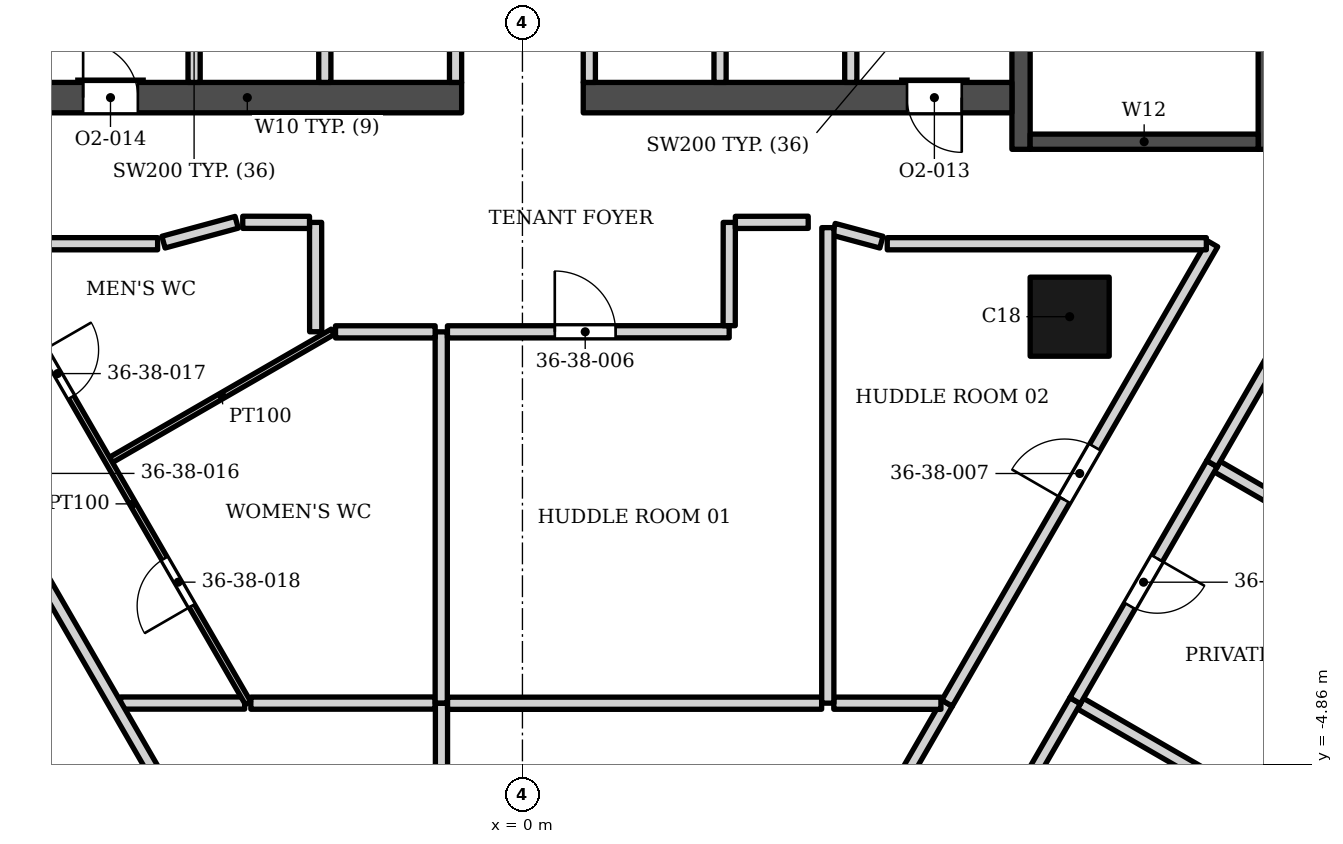
"""IFC4 building model, lengths in metres.
Left out: names, types, materials, properties, quantities, classifications, styles, units other than length and angle.
Written with IfcOpenShell. Run it as: python <this file> out.ifc"""

import sys

from ifc_helpers import new_model, si_unit, direction, frame, frame_2d, origin, origin_2d, place, context, subcontext, project, spatial, rectangle, extrude, element, fill, save


model = new_model("IFC4")
c1 = context("Model", 3, precision=1e-05, world=origin(), true_north=direction((0.0, 1.0)))
c2 = subcontext(c1, "Body", "Model", "MODEL_VIEW")
j1 = project(units=[si_unit("LENGTHUNIT", "METRE"), si_unit("PLANEANGLEUNIT", "RADIAN")], contexts=[c1])
p1 = place(None, origin())
s1 = spatial("IfcSite", under=j1, at=p1, CompositionType="ELEMENT")
p2 = place(p1, origin())
s2 = spatial("IfcBuilding", under=s1, at=p2, CompositionType="ELEMENT")
p3 = place(p2, frame((0.0, 0.0, 156.3)))
s3 = spatial("IfcBuildingStorey", under=s2, at=p3, CompositionType="ELEMENT", Elevation=156.3)
p4 = place(p3, frame((12.35, 5.253, 0.0), z_axis=(0.0, 0.0, 1.0), x_axis=(0.0, 1.0, 0.0)))
e1 = element("IfcWall", 1, at=p4, inside=s3, PredefinedType="SHEAR", context=c2, shape_type="SweptSolid", body=[
    extrude(rectangle(XDim=13.3, YDim=0.5, at=frame_2d((6.65, 0.0))), origin(), (0.0, 0.0, 1.0), 3.9),
])
p5 = place(p3, frame((8.2, 5.253, 0.0), z_axis=(0.0, 0.0, 1.0), x_axis=(0.0, 1.0, 0.0)))
e2 = element("IfcWall", 2, at=p5, inside=s3, PredefinedType="SHEAR", context=c2, shape_type="SweptSolid", body=[
    extrude(rectangle(XDim=13.3, YDim=0.3, at=frame_2d((6.65, 0.0))), origin(), (0.0, 0.0, 1.0), 3.9),
])
p6 = place(p5, frame((7.1, 0.0, 0.0)))
e3 = element("IfcOpeningElement", 3, at=p6, cuts=e2, PredefinedType="OPENING", context=c2, shape_type="SweptSolid", body=[
    extrude(rectangle(XDim=1.4, YDim=2.1, at=frame_2d((0.7, 1.05))), frame((0.0, 0.16, 0.0), z_axis=(0.0, -1.0, 0.0), x_axis=(1.0, 0.0, 0.0)), (0.0, 0.0, 1.0), 0.32),
])
p7 = place(p5, frame((5.05, 0.0, 0.0)))
e4 = element("IfcOpeningElement", 4, at=p7, cuts=e2, PredefinedType="OPENING", context=c2, shape_type="SweptSolid", body=[
    extrude(rectangle(XDim=1.4, YDim=2.1, at=frame_2d((0.7, 1.05))), frame((0.0, 0.16, 0.0), z_axis=(0.0, -1.0, 0.0), x_axis=(1.0, 0.0, 0.0)), (0.0, 0.0, 1.0), 0.32),
])
p8 = place(p3, frame((8.35, 5.378, 0.0), z_axis=(0.0, 0.0, 1.0), x_axis=(1.0, 0.0, 0.0)))
e5 = element("IfcWall", 5, at=p8, inside=s3, PredefinedType="SHEAR", context=c2, shape_type="SweptSolid", body=[
    extrude(rectangle(XDim=3.75, YDim=0.25, at=frame_2d((1.875, 0.0))), origin(), (0.0, 0.0, 1.0), 3.9),
])
p9 = place(p3, frame((-8.05, 6.103, 0.0), z_axis=(0.0, 0.0, 1.0), x_axis=(1.0, 0.0, 0.0)))
e6 = element("IfcWall", 6, at=p9, inside=s3, PredefinedType="SHEAR", context=c2, shape_type="SweptSolid", body=[
    extrude(rectangle(XDim=7.05, YDim=0.5, at=frame_2d((3.525, 0.0))), origin(), (0.0, 0.0, 1.0), 3.9),
])
p10 = place(p9, frame((0.825, 0.0, 0.0)))
e7 = element("IfcOpeningElement", 7, at=p10, cuts=e6, PredefinedType="OPENING", context=c2, shape_type="SweptSolid", body=[
    extrude(rectangle(XDim=0.9, YDim=2.1, at=frame_2d((0.45, 1.05))), frame((0.0, 0.26, 0.0), z_axis=(0.0, -1.0, 0.0), x_axis=(1.0, 0.0, 0.0)), (0.0, 0.0, 1.0), 0.52),
])
p11 = place(p3, frame((1.0, 6.103, 0.0), z_axis=(0.0, 0.0, 1.0), x_axis=(1.0, 0.0, 0.0)))
e8 = element("IfcWall", 8, at=p11, inside=s3, PredefinedType="SHEAR", context=c2, shape_type="SweptSolid", body=[
    extrude(rectangle(XDim=7.05, YDim=0.5, at=frame_2d((3.525, 0.0))), origin(), (0.0, 0.0, 1.0), 3.9),
])
p12 = place(p11, frame((5.325, 0.0, 0.0)))
e9 = element("IfcOpeningElement", 9, at=p12, cuts=e8, PredefinedType="OPENING", context=c2, shape_type="SweptSolid", body=[
    extrude(rectangle(XDim=0.9, YDim=2.1, at=frame_2d((0.45, 1.05))), frame((0.0, 0.26, 0.0), z_axis=(0.0, -1.0, 0.0), x_axis=(1.0, 0.0, 0.0)), (0.0, 0.0, 1.0), 0.52),
])
p13 = place(p3, frame((9.0, 2.5, 0.0), z_axis=(0.0, 0.0, 1.0), x_axis=(1.0, 0.0, 0.0)))
e10 = element("IfcColumn", 10, at=p13, inside=s3, PredefinedType="COLUMN", context=c2, shape_type="SweptSolid", body=[
    extrude(rectangle(XDim=1.3, YDim=1.3, at=origin_2d()), origin(), (0.0, 0.0, 1.0), 3.9),
])
for number, where, z_axis, x_axis in (
    (11, (-5.4, 6.353, 0.0), (0.0, 0.0, 1.0), (0.0, 1.0, 0.0)),
    (12, (-3.25, 6.353, 0.0), (0.0, 0.0, 1.0), (0.0, 1.0, 0.0)),
    (13, (-1.1, 6.353, 0.0), (0.0, 0.0, 1.0), (0.0, 1.0, 0.0)),
    (14, (1.1, 6.353, 0.0), (0.0, 0.0, 1.0), (0.0, 1.0, 0.0)),
    (15, (3.25, 6.353, 0.0), (0.0, 0.0, 1.0), (0.0, 1.0, 0.0)),
    (16, (5.4, 6.353, 0.0), (0.0, 0.0, 1.0), (0.0, 1.0, 0.0)),
):
    element("IfcWall", number, at=place(p3, frame(where, z_axis=z_axis, x_axis=x_axis)), inside=s3, PredefinedType="SOLIDWALL", context=c2, shape_type="SweptSolid", body=[
        extrude(rectangle(XDim=2.5, YDim=0.2, at=frame_2d((1.25, 0.0))), origin(), (0.0, 0.0, 1.0), 3.73),
    ])
p14 = place(p3, frame((-11.065, 0.082, 0.0), z_axis=(0.0, 0.0, 1.0), x_axis=(0.499996012009, -0.86602770624, 0.0)))
e17 = element("IfcWall", 17, at=p14, inside=s3, PredefinedType="PARTITIONING", context=c2, shape_type="SweptSolid", body=[
    extrude(rectangle(XDim=18.0, YDim=0.2, at=frame_2d((9.0, 0.0))), origin(), (0.0, 0.0, 1.0), 2.884),
])
p15 = place(p14, frame((4.0, 0.0, 0.0)))
e18 = element("IfcOpeningElement", 18, at=p15, cuts=e17, PredefinedType="OPENING", context=c2, shape_type="SweptSolid", body=[
    extrude(rectangle(XDim=1.0, YDim=2.1, at=frame_2d((0.5, 1.05))), frame((0.0, 0.11, 0.0), z_axis=(0.0, -1.0, 0.0), x_axis=(1.0, 0.0, 0.0)), (0.0, 0.0, 1.0), 0.22),
])
p16 = place(p14, frame((13.0, 0.0, 0.0)))
e19 = element("IfcOpeningElement", 19, at=p16, cuts=e17, PredefinedType="OPENING", context=c2, shape_type="SweptSolid", body=[
    extrude(rectangle(XDim=1.0, YDim=2.4, at=frame_2d((0.5, 1.2))), frame((0.0, 0.11, 0.0), z_axis=(0.0, -1.0, 0.0), x_axis=(1.0, 0.0, 0.0)), (0.0, 0.0, 1.0), 0.22),
])
p17 = place(p3, frame((3.426, -10.022, 0.0), z_axis=(0.0, 0.0, 1.0), x_axis=(0.499791742778, 0.866145607765, 0.0)))
e20 = element("IfcWall", 20, at=p17, inside=s3, PredefinedType="PARTITIONING", context=c2, shape_type="SweptSolid", body=[
    extrude(rectangle(XDim=7.117, YDim=0.2, at=frame_2d((3.559, 0.0))), origin(), (0.0, 0.0, 1.0), 2.884),
])
p18 = place(p17, frame((3.11, 0.0, 0.0)))
e21 = element("IfcOpeningElement", 21, at=p18, cuts=e20, PredefinedType="OPENING", context=c2, shape_type="SweptSolid", body=[
    extrude(rectangle(XDim=0.9, YDim=2.1, at=frame_2d((0.45, 1.05))), frame((0.0, 0.11, 0.0), z_axis=(0.0, -1.0, 0.0), x_axis=(1.0, 0.0, 0.0)), (0.0, 0.0, 1.0), 0.22),
])
p19 = place(p3, frame((-4.467, -3.855, 0.0), z_axis=(0.0, 0.0, 1.0), x_axis=(0.999999841097, 0.000563743166, 0.0)))
e22 = element("IfcWall", 22, at=p19, inside=s3, PredefinedType="PARTITIONING", context=c2, shape_type="SweptSolid", body=[
    extrude(rectangle(XDim=3.031, YDim=0.2, at=frame_2d((1.516, 0.0))), origin(), (0.0, 0.0, 1.0), 3.73),
])
p20 = place(p3, frame((-1.332, -12.767, 0.0), z_axis=(0.0, 0.0, 1.0), x_axis=(0.0, 1.0, 0.0)))
e23 = element("IfcWall", 23, at=p20, inside=s3, PredefinedType="PARTITIONING", context=c2, shape_type="SweptSolid", body=[
    extrude(rectangle(XDim=8.909, YDim=0.2, at=frame_2d((4.455, 0.0))), origin(), (0.0, 0.0, 1.0), 2.95),
])
p21 = place(p3, frame((-1.232, -3.857, 0.0), z_axis=(0.0, 0.0, 1.0), x_axis=(0.999999961423, 0.000277766745, 0.0)))
e24 = element("IfcWall", 24, at=p21, inside=s3, PredefinedType="PARTITIONING", context=c2, shape_type="SweptSolid", body=[
    extrude(rectangle(XDim=6.153, YDim=0.2, at=frame_2d((3.076, 0.0))), origin(), (0.0, 0.0, 1.0), 3.73),
])
p22 = place(p3, frame((5.121, -3.856, 0.0), z_axis=(0.0, 0.0, 1.0), x_axis=(0.999999529486, -0.000970066062, 0.0)))
e25 = element("IfcWall", 25, at=p22, inside=s3, PredefinedType="PARTITIONING", context=c2, shape_type="SweptSolid", body=[
    extrude(rectangle(XDim=1.762, YDim=0.2, at=frame_2d((0.881, 0.0))), origin(), (0.0, 0.0, 1.0), 3.73),
])
p23 = place(p3, frame((6.984, -3.855, 0.0), z_axis=(0.0, 0.0, 1.0), x_axis=(0.500195547237, 0.865912475095, 0.0)))
e26 = element("IfcWall", 26, at=p23, inside=s3, PredefinedType="PARTITIONING", context=c2, shape_type="SweptSolid", body=[
    extrude(rectangle(XDim=8.725, YDim=0.2, at=frame_2d((4.363, 0.0))), origin(), (0.0, 0.0, 1.0), 3.052),
])
p24 = place(p23, frame((3.861, 0.0, 0.0)))
e27 = element("IfcOpeningElement", 27, at=p24, cuts=e26, PredefinedType="OPENING", context=c2, shape_type="SweptSolid", body=[
    extrude(rectangle(XDim=1.0, YDim=2.1, at=frame_2d((0.5, 1.05))), frame((0.0, 0.11, 0.0), z_axis=(0.0, -1.0, 0.0), x_axis=(1.0, 0.0, 0.0)), (0.0, 0.0, 1.0), 0.22),
])
p25 = place(p3, frame((9.176, -3.862, 0.0), z_axis=(0.0, 0.0, 1.0), x_axis=(0.865807555134, -0.500377135241, 0.0)))
e28 = element("IfcWall", 28, at=p25, inside=s3, PredefinedType="PARTITIONING", context=c2, shape_type="SweptSolid", body=[
    extrude(rectangle(XDim=4.25, YDim=0.2, at=frame_2d((2.125, 0.0))), origin(), (0.0, 0.0, 1.0), 3.052),
])
p26 = place(p3, frame((-6.61, -3.854, 0.0), z_axis=(0.0, 0.0, 1.0), x_axis=(0.999999992849, 0.000119588614, 0.0)))
e29 = element("IfcWall", 29, at=p26, inside=s3, PredefinedType="PARTITIONING", context=c2, shape_type="SweptSolid", body=[
    extrude(rectangle(XDim=2.042, YDim=0.2, at=frame_2d((1.021, 0.0))), origin(), (0.0, 0.0, 1.0), 3.73),
])
p27 = place(p3, frame((-1.335, -3.854, 0.0), z_axis=(0.0, 0.0, 1.0), x_axis=(0.0, 1.0, 0.0)))
e30 = element("IfcWall", 30, at=p27, inside=s3, PredefinedType="PARTITIONING", context=c2, shape_type="SweptSolid", body=[
    extrude(rectangle(XDim=6.104, YDim=0.2, at=frame_2d((3.052, 0.0))), origin(), (0.0, 0.0, 1.0), 3.73),
])
p28 = place(p3, frame((6.841, -7.71, 0.0), z_axis=(0.0, 0.0, 1.0), x_axis=(0.499974615194, 0.866040059213, 0.0)))
e31 = element("IfcWall", 31, at=p28, inside=s3, PredefinedType="PARTITIONING", context=c2, shape_type="SweptSolid", body=[
    extrude(rectangle(XDim=4.498, YDim=0.2, at=frame_2d((2.249, 0.0))), origin(), (0.0, 0.0, 1.0), 3.052),
])
p29 = place(p28, frame((1.798, 0.0, 0.0)))
e32 = element("IfcOpeningElement", 32, at=p29, cuts=e31, PredefinedType="OPENING", context=c2, shape_type="SweptSolid", body=[
    extrude(rectangle(XDim=0.9, YDim=2.1, at=frame_2d((0.45, 1.05))), frame((0.0, 0.11, 0.0), z_axis=(0.0, -1.0, 0.0), x_axis=(1.0, 0.0, 0.0)), (0.0, 0.0, 1.0), 0.22),
])
p30 = place(p3, frame((11.427, 0.035, 0.0), z_axis=(0.0, 0.0, 1.0), x_axis=(0.865857330643, -0.500290998291, 0.0)))
e33 = element("IfcWall", 33, at=p30, inside=s3, PredefinedType="PARTITIONING", context=c2, shape_type="SweptSolid", body=[
    extrude(rectangle(XDim=4.25, YDim=0.2, at=frame_2d((2.125, 0.0))), origin(), (0.0, 0.0, 1.0), 3.052),
])
p31 = place(p3, frame((9.09, -3.815, 0.0), z_axis=(0.0, 0.0, 1.0), x_axis=(0.499972939495, 0.866041026611, 0.0)))
e34 = element("IfcWall", 34, at=p31, inside=s3, PredefinedType="PARTITIONING", context=c2, shape_type="SweptSolid", body=[
    extrude(rectangle(XDim=4.5, YDim=0.2, at=frame_2d((2.25, 0.0))), origin(), (0.0, 0.0, 1.0), 3.052),
])
p32 = place(p31, frame((1.8, 0.0, 0.0)))
e35 = element("IfcOpeningElement", 35, at=p32, cuts=e34, PredefinedType="OPENING", context=c2, shape_type="SweptSolid", body=[
    extrude(rectangle(XDim=0.9, YDim=2.1, at=frame_2d((0.45, 1.05))), frame((0.0, 0.11, 0.0), z_axis=(0.0, -1.0, 0.0), x_axis=(1.0, 0.0, 0.0)), (0.0, 0.0, 1.0), 0.22),
])
p33 = place(p3, frame((-3.402, 4.051, 0.0), z_axis=(0.0, 0.0, 1.0), x_axis=(0.001086217961, -0.999999410065, 0.0)))
e36 = element("IfcWall", 36, at=p33, inside=s3, PredefinedType="PARTITIONING", context=c2, shape_type="SweptSolid", body=[
    extrude(rectangle(XDim=1.798, YDim=0.2, at=frame_2d((0.899, 0.0))), origin(), (0.0, 0.0, 1.0), 3.73),
])
p34 = place(p3, frame((-6.767, 0.145, 0.0), z_axis=(0.0, 0.0, 1.0), x_axis=(0.865929781716, 0.500165585718, 0.0)))
e37 = element("IfcWall", 37, at=p34, inside=s3, PredefinedType="PARTITIONING", context=c2, shape_type="SweptSolid", body=[
    extrude(rectangle(XDim=4.212, YDim=0.1, at=frame_2d((2.106, 0.0))), origin(), (0.0, 0.0, 1.0), 2.884),
])
p35 = place(p3, frame((-3.074, 2.25, 0.0), z_axis=(0.0, 0.0, 1.0), x_axis=(1.0, 0.0, 0.0)))
e38 = element("IfcWall", 38, at=p35, inside=s3, PredefinedType="PARTITIONING", context=c2, shape_type="SweptSolid", body=[
    extrude(rectangle(XDim=1.639, YDim=0.2, at=frame_2d((0.819, 0.0))), origin(), (0.0, 0.0, 1.0), 3.73),
])
p36 = place(p3, frame((-1.233, 2.25, 0.0), z_axis=(0.0, 0.0, 1.0), x_axis=(0.999999911161, 0.000421518483, 0.0)))
e39 = element("IfcWall", 39, at=p36, inside=s3, PredefinedType="PARTITIONING", context=c2, shape_type="SweptSolid", body=[
    extrude(rectangle(XDim=4.634, YDim=0.2, at=frame_2d((2.317, 0.0))), origin(), (0.0, 0.0, 1.0), 3.73),
])
p37 = place(p36, frame((1.766, 0.0, 0.0)))
e40 = element("IfcOpeningElement", 40, at=p37, cuts=e39, PredefinedType="OPENING", context=c2, shape_type="SweptSolid", body=[
    extrude(rectangle(XDim=1.0, YDim=2.1, at=frame_2d((0.5, 1.05))), frame((0.0, 0.11, 0.0), z_axis=(0.0, -1.0, 0.0), x_axis=(1.0, 0.0, 0.0)), (0.0, 0.0, 1.0), 0.22),
])
p38 = place(p3, frame((-8.3, 2.697, 0.0), z_axis=(0.0, 0.0, 1.0), x_axis=(0.500524865803, -0.86572216023, 0.0)))
e41 = element("IfcWall", 41, at=p38, inside=s3, PredefinedType="PARTITIONING", context=c2, shape_type="SweptSolid", body=[
    extrude(rectangle(XDim=7.566, YDim=0.1, at=frame_2d((3.783, 0.0))), origin(), (0.0, 0.0, 1.0), 2.884),
])
p39 = place(p38, frame((0.858, 0.0, 0.0)))
e42 = element("IfcOpeningElement", 42, at=p39, cuts=e41, PredefinedType="OPENING", context=c2, shape_type="SweptSolid", body=[
    extrude(rectangle(XDim=0.9, YDim=2.1, at=frame_2d((0.45, 1.05))), frame((0.0, 0.06, 0.0), z_axis=(0.0, -1.0, 0.0), x_axis=(1.0, 0.0, 0.0)), (0.0, 0.0, 1.0), 0.12),
])
p40 = place(p38, frame((4.82, 0.0, 0.0)))
e43 = element("IfcOpeningElement", 43, at=p40, cuts=e41, PredefinedType="OPENING", context=c2, shape_type="SweptSolid", body=[
    extrude(rectangle(XDim=0.9, YDim=2.1, at=frame_2d((0.45, 1.05))), frame((0.0, 0.06, 0.0), z_axis=(0.0, -1.0, 0.0), x_axis=(1.0, 0.0, 0.0)), (0.0, 0.0, 1.0), 0.12),
])
p41 = place(p3, frame((-11.073, 3.7, 0.0), z_axis=(0.0, 0.0, 1.0), x_axis=(0.50018368245, -0.865919328697, 0.0)))
e44 = element("IfcWall", 44, at=p41, inside=s3, PredefinedType="PARTITIONING", context=c2, shape_type="SweptSolid", body=[
    extrude(rectangle(XDim=19.274, YDim=0.2, at=frame_2d((9.637, 0.0))), origin(), (0.0, 0.0, 1.0), 2.884),
])
p42 = place(p41, frame((13.651, 0.0, 0.0)))
e45 = element("IfcOpeningElement", 45, at=p42, cuts=e44, PredefinedType="OPENING", context=c2, shape_type="SweptSolid", body=[
    extrude(rectangle(XDim=0.9, YDim=2.1, at=frame_2d((0.45, 1.05))), frame((0.0, 0.11, 0.0), z_axis=(0.0, -1.0, 0.0), x_axis=(1.0, 0.0, 0.0)), (0.0, 0.0, 1.0), 0.22),
])
p43 = place(p41, frame((3.862, 0.0, 0.0)))
e46 = element("IfcOpeningElement", 46, at=p43, cuts=e44, PredefinedType="OPENING", context=c2, shape_type="SweptSolid", body=[
    extrude(rectangle(XDim=1.0, YDim=2.1, at=frame_2d((0.5, 1.05))), frame((0.0, 0.11, 0.0), z_axis=(0.0, -1.0, 0.0), x_axis=(1.0, 0.0, 0.0)), (0.0, 0.0, 1.0), 0.22),
])
p44 = place(p3, frame((-10.973, 3.7, 0.0), z_axis=(0.0, 0.0, 1.0), x_axis=(1.0, 0.0, 0.0)))
e47 = element("IfcWall", 47, at=p44, inside=s3, PredefinedType="PARTITIONING", context=c2, shape_type="SweptSolid", body=[
    extrude(rectangle(XDim=4.973, YDim=0.2, at=frame_2d((2.486, 0.0))), origin(), (0.0, 0.0, 1.0), 3.332),
])
p45 = place(p3, frame((6.0, 3.7, 0.0), z_axis=(0.0, 0.0, 1.0), x_axis=(1.0, 0.0, 0.0)))
e48 = element("IfcWall", 48, at=p45, inside=s3, PredefinedType="PARTITIONING", context=c2, shape_type="SweptSolid", body=[
    extrude(rectangle(XDim=5.248, YDim=0.2, at=frame_2d((2.624, 0.0))), origin(), (0.0, 0.0, 1.0), 3.332),
])
p46 = place(p3, frame((11.341, 0.083, 0.0), z_axis=(0.0, 0.0, 1.0), x_axis=(0.499673523279, 0.866213813174, 0.0)))
e49 = element("IfcWall", 49, at=p46, inside=s3, PredefinedType="PARTITIONING", context=c2, shape_type="SweptSolid", body=[
    extrude(rectangle(XDim=4.176, YDim=0.2, at=frame_2d((2.088, 0.0))), origin(), (0.0, 0.0, 1.0), 3.052),
])
p47 = place(p3, frame((5.118, 3.937, 0.0), z_axis=(0.0, 0.0, 1.0), x_axis=(0.965583853378, -0.260091949308, 0.0)))
e50 = element("IfcWall", 50, at=p47, inside=s3, PredefinedType="PARTITIONING", context=c2, shape_type="SweptSolid", body=[
    extrude(rectangle(XDim=0.813, YDim=0.2, at=frame_2d((0.406, 0.0))), origin(), (0.0, 0.0, 1.0), 3.73),
])
p48 = place(p3, frame((5.022, -3.855, 0.0), z_axis=(0.0, 0.0, 1.0), x_axis=(0.000218538286, 0.999999976121, 0.0)))
e51 = element("IfcWall", 51, at=p48, inside=s3, PredefinedType="PARTITIONING", context=c2, shape_type="SweptSolid", body=[
    extrude(rectangle(XDim=7.82, YDim=0.2, at=frame_2d((3.91, 0.0))), origin(), (0.0, 0.0, 1.0), 3.73),
])
p49 = place(p3, frame((-5.904, 3.726, 0.0), z_axis=(0.0, 0.0, 1.0), x_axis=(0.965137813174, 0.26174224264, 0.0)))
e52 = element("IfcWall", 52, at=p49, inside=s3, PredefinedType="PARTITIONING", context=c2, shape_type="SweptSolid", body=[
    extrude(rectangle(XDim=1.247, YDim=0.2, at=frame_2d((0.624, 0.0))), origin(), (0.0, 0.0, 1.0), 2.884),
])
p50 = place(p3, frame((-4.6, 4.052, 0.0), z_axis=(0.0, 0.0, 1.0), x_axis=(0.999999110322, -0.001333925003, 0.0)))
e53 = element("IfcWall", 53, at=p50, inside=s3, PredefinedType="PARTITIONING", context=c2, shape_type="SweptSolid", body=[
    extrude(rectangle(XDim=1.098, YDim=0.2, at=frame_2d((0.549, 0.0))), origin(), (0.0, 0.0, 1.0), 3.73),
])
p51 = place(p3, frame((3.4, 2.352, 0.0), z_axis=(0.0, 0.0, 1.0), x_axis=(0.001150085496, 0.999999338651, 0.0)))
e54 = element("IfcWall", 54, at=p51, inside=s3, PredefinedType="PARTITIONING", context=c2, shape_type="SweptSolid", body=[
    extrude(rectangle(XDim=1.698, YDim=0.2, at=frame_2d((0.849, 0.0))), origin(), (0.0, 0.0, 1.0), 3.73),
])
p52 = place(p3, frame((3.502, 4.051, 0.0), z_axis=(0.0, 0.0, 1.0), x_axis=(0.999998982503, 0.001426532072, 0.0)))
e55 = element("IfcWall", 55, at=p52, inside=s3, PredefinedType="PARTITIONING", context=c2, shape_type="SweptSolid", body=[
    extrude(rectangle(XDim=1.198, YDim=0.2, at=frame_2d((0.599, 0.0))), origin(), (0.0, 0.0, 1.0), 3.73),
])
p53 = place(p10, origin())
e56 = element("IfcDoor", 56, at=p53, inside=s3, OperationType="SINGLE_SWING_LEFT", PredefinedType="DOOR", context=c2, shape_type="SweptSolid", body=[
    extrude(rectangle(XDim=0.9, YDim=2.1, at=frame_2d((0.45, 1.05))), frame((0.0, 0.025, 0.0), z_axis=(0.0, -1.0, 0.0), x_axis=(1.0, 0.0, 0.0)), (0.0, 0.0, 1.0), 0.05),
])
fill(e7, e56)
p54 = place(p12, origin())
e57 = element("IfcDoor", 57, at=p54, inside=s3, OperationType="SINGLE_SWING_RIGHT", PredefinedType="DOOR", context=c2, shape_type="SweptSolid", body=[
    extrude(rectangle(XDim=0.9, YDim=2.1, at=frame_2d((0.45, 1.05))), frame((0.0, 0.025, 0.0), z_axis=(0.0, -1.0, 0.0), x_axis=(1.0, 0.0, 0.0)), (0.0, 0.0, 1.0), 0.05),
])
fill(e9, e57)
p55 = place(p32, origin())
e58 = element("IfcDoor", 58, at=p55, inside=s3, OperationType="SINGLE_SWING_RIGHT", PredefinedType="DOOR", context=c2, shape_type="SweptSolid", body=[
    extrude(rectangle(XDim=0.9, YDim=2.1, at=frame_2d((0.45, 1.05))), frame((0.0, 0.025, 0.0), z_axis=(0.0, -1.0, 0.0), x_axis=(1.0, 0.0, 0.0)), (0.0, 0.0, 1.0), 0.05),
])
fill(e35, e58)
p56 = place(p37, origin())
e59 = element("IfcDoor", 59, at=p56, inside=s3, OperationType="SINGLE_SWING_LEFT", PredefinedType="DOOR", context=c2, shape_type="SweptSolid", body=[
    extrude(rectangle(XDim=1.0, YDim=2.1, at=frame_2d((0.5, 1.05))), frame((0.0, 0.025, 0.0), z_axis=(0.0, -1.0, 0.0), x_axis=(1.0, 0.0, 0.0)), (0.0, 0.0, 1.0), 0.05),
])
fill(e40, e59)
p57 = place(p24, origin())
e60 = element("IfcDoor", 60, at=p57, inside=s3, OperationType="SINGLE_SWING_LEFT", PredefinedType="DOOR", context=c2, shape_type="SweptSolid", body=[
    extrude(rectangle(XDim=1.0, YDim=2.1, at=frame_2d((0.5, 1.05))), frame((0.0, 0.025, 0.0), z_axis=(0.0, -1.0, 0.0), x_axis=(1.0, 0.0, 0.0)), (0.0, 0.0, 1.0), 0.05),
])
fill(e27, e60)
p58 = place(p39, origin())
e61 = element("IfcDoor", 61, at=p58, inside=s3, OperationType="SINGLE_SWING_LEFT", PredefinedType="DOOR", context=c2, shape_type="SweptSolid", body=[
    extrude(rectangle(XDim=0.9, YDim=2.1, at=frame_2d((0.45, 1.05))), frame((0.0, 0.025, 0.0), z_axis=(0.0, -1.0, 0.0), x_axis=(1.0, 0.0, 0.0)), (0.0, 0.0, 1.0), 0.05),
])
fill(e42, e61)
p59 = place(p40, origin())
e62 = element("IfcDoor", 62, at=p59, inside=s3, OperationType="SINGLE_SWING_RIGHT", PredefinedType="DOOR", context=c2, shape_type="SweptSolid", body=[
    extrude(rectangle(XDim=0.9, YDim=2.1, at=frame_2d((0.45, 1.05))), frame((0.0, 0.025, 0.0), z_axis=(0.0, -1.0, 0.0), x_axis=(1.0, 0.0, 0.0)), (0.0, 0.0, 1.0), 0.05),
])
fill(e43, e62)
save(model, sys.argv[1])
